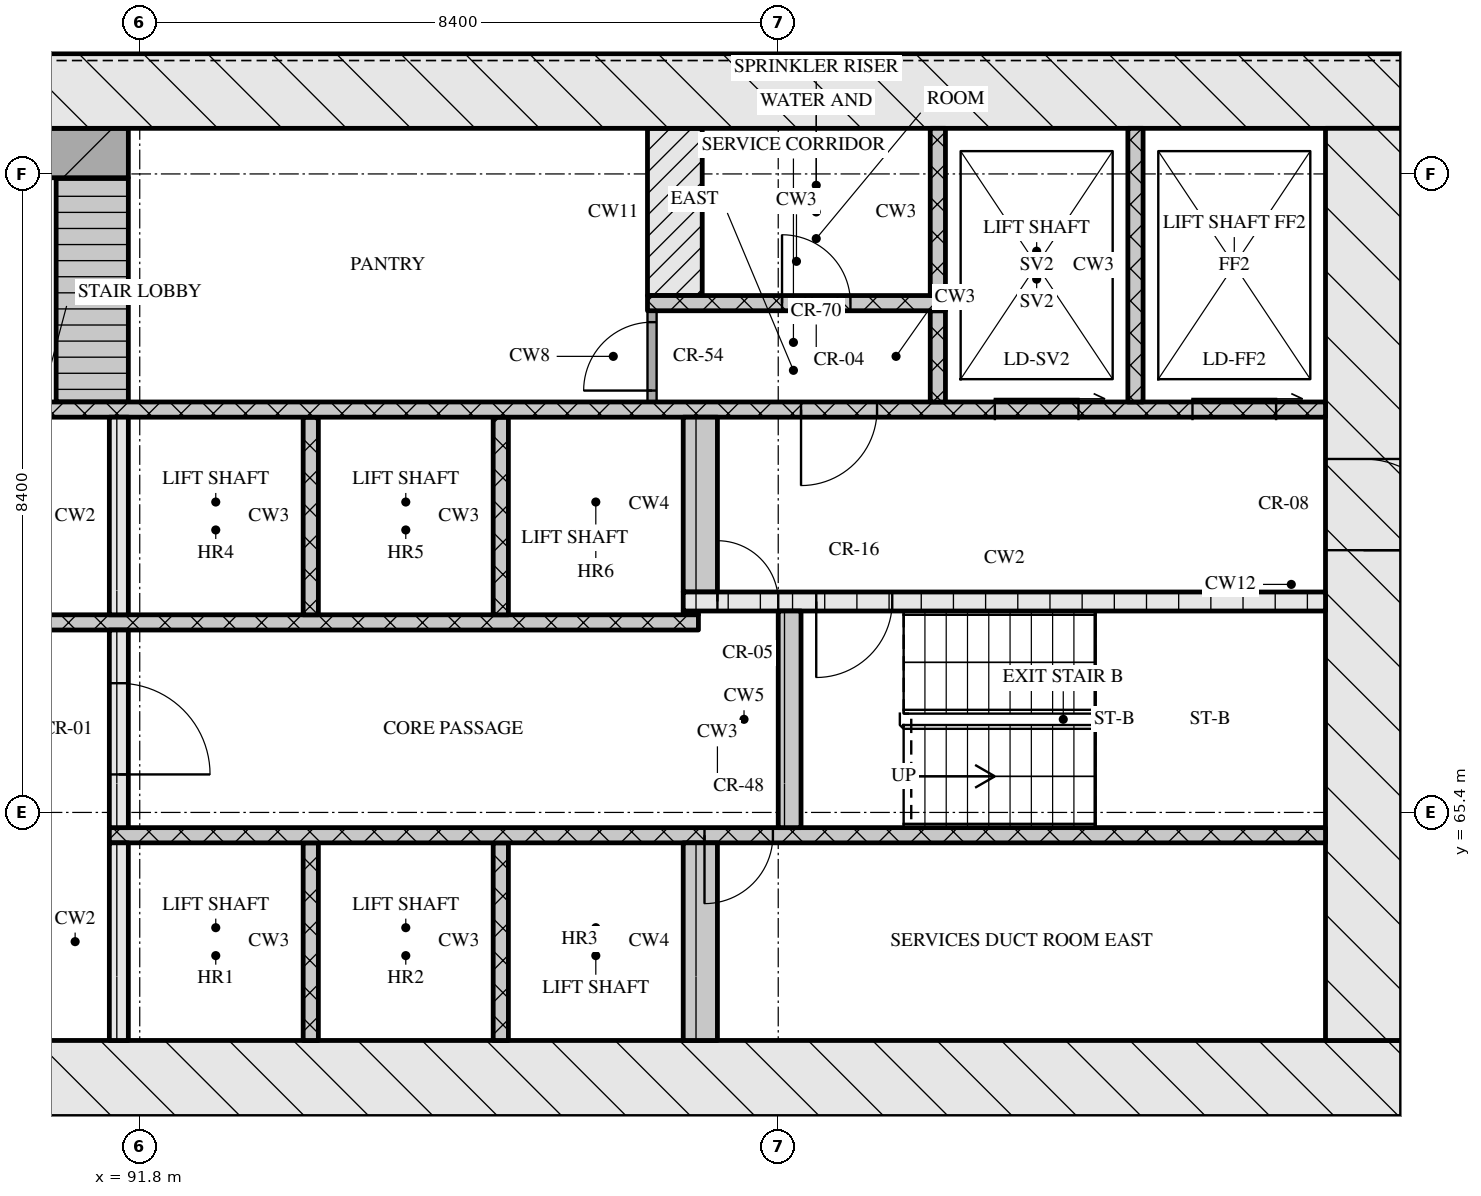
"""IFC4 building model, lengths in metres.
Left out: names, types, materials, properties, quantities, classifications, styles, units other than length and angle.
Written with IfcOpenShell. Run it as: python <this file> out.ifc"""

import sys

from ifc_helpers import new_model, si_unit, direction, frame, frame_2d, origin, place, context, subcontext, project, spatial, rectangle, extrude, element, fill, save


model = new_model("IFC4")
c1 = context("Model", 3, precision=1e-05, world=origin(), true_north=direction((0.0, 1.0)))
c2 = subcontext(c1, "Body", "Model", "MODEL_VIEW")
j1 = project(units=[si_unit("LENGTHUNIT", "METRE"), si_unit("PLANEANGLEUNIT", "RADIAN")], contexts=[c1])
p1 = place(None, origin())
s1 = spatial("IfcSite", under=j1, at=p1, CompositionType="ELEMENT")
p2 = place(p1, origin())
s2 = spatial("IfcBuilding", under=s1, at=p2, CompositionType="ELEMENT")
p3 = place(p2, frame((0.0, 0.0, 134.85)))
s3 = spatial("IfcBuildingStorey", under=s2, at=p3, CompositionType="ELEMENT", Elevation=134.85)
p4 = place(p3, frame((66.8, 61.9, 0.0), z_axis=(0.0, 0.0, 1.0), x_axis=(1.0, 0.0, 0.0)))
e1 = element("IfcWall", 1, at=p4, inside=s3, PredefinedType="SOLIDWALL", context=c2, shape_type="SweptSolid", body=[
    extrude(rectangle(XDim=41.6, YDim=1.0, at=frame_2d((20.8, 0.0))), origin(), (0.0, 0.0, 1.0), 3.32),
])
p5 = place(p4, frame((21.15, 0.0, 0.0)))
e2 = element("IfcOpeningElement", 2, at=p5, cuts=e1, PredefinedType="OPENING", context=c2, shape_type="SweptSolid", body=[
    extrude(rectangle(XDim=1.8, YDim=2.1, at=frame_2d((0.9, 1.05))), frame((0.0, 0.51, 0.0), z_axis=(0.0, -1.0, 0.0), x_axis=(1.0, 0.0, 0.0)), (0.0, 0.0, 1.0), 1.02),
])
p6 = place(p3, frame((66.8, 74.9, 0.0), z_axis=(0.0, 0.0, 1.0), x_axis=(1.0, 0.0, 0.0)))
e3 = element("IfcWall", 3, at=p6, inside=s3, PredefinedType="SOLIDWALL", context=c2, shape_type="SweptSolid", body=[
    extrude(rectangle(XDim=41.6, YDim=1.0, at=frame_2d((20.8, 0.0))), origin(), (0.0, 0.0, 1.0), 3.32),
])
p7 = place(p3, frame((107.9, 62.4, 0.0), z_axis=(0.0, 0.0, 1.0), x_axis=(0.0, 1.0, 0.0)))
e4 = element("IfcWall", 4, at=p7, inside=s3, PredefinedType="SOLIDWALL", context=c2, shape_type="SweptSolid", body=[
    extrude(rectangle(XDim=12.0, YDim=1.0, at=frame_2d((6.0, 0.0))), origin(), (0.0, 0.0, 1.0), 3.32),
])
p8 = place(p7, frame((6.45, 0.0, 0.0)))
e5 = element("IfcOpeningElement", 5, at=p8, cuts=e4, PredefinedType="OPENING", context=c2, shape_type="SweptSolid", body=[
    extrude(rectangle(XDim=1.2, YDim=2.1, at=frame_2d((0.6, 1.05))), frame((0.0, 0.51, 0.0), z_axis=(0.0, -1.0, 0.0), x_axis=(1.0, 0.0, 0.0)), (0.0, 0.0, 1.0), 1.02),
])
p9 = place(p3, frame((91.525, 62.4, 0.0), z_axis=(0.0, 0.0, 1.0), x_axis=(0.0, 1.0, 0.0)))
e6 = element("IfcWall", 6, at=p9, inside=s3, PredefinedType="SOLIDWALL", context=c2, shape_type="SweptSolid", body=[
    extrude(rectangle(XDim=2.6, YDim=0.25, at=frame_2d((1.3, 0.0))), origin(), (0.0, 0.0, 1.0), 3.32),
])
for number, where, z_axis, x_axis in (
    (7, (94.05, 62.4, 0.0), (0.0, 0.0, 1.0), (0.0, 1.0, 0.0)),
    (8, (96.55, 62.4, 0.0), (0.0, 0.0, 1.0), (0.0, 1.0, 0.0)),
):
    element("IfcWall", number, at=place(p3, frame(where, z_axis=z_axis, x_axis=x_axis)), inside=s3, PredefinedType="SOLIDWALL", context=c2, shape_type="SweptSolid", body=[
        extrude(rectangle(XDim=2.6, YDim=0.2, at=frame_2d((1.3, 0.0))), origin(), (0.0, 0.0, 1.0), 3.32),
    ])
p10 = place(p3, frame((99.175, 62.4, 0.0), z_axis=(0.0, 0.0, 1.0), x_axis=(0.0, 1.0, 0.0)))
e9 = element("IfcWall", 9, at=p10, inside=s3, PredefinedType="SOLIDWALL", context=c2, shape_type="SweptSolid", body=[
    extrude(rectangle(XDim=2.6, YDim=0.45, at=frame_2d((1.3, 0.0))), origin(), (0.0, 0.0, 1.0), 3.32),
])
p11 = place(p3, frame((91.4, 65.1, 0.0), z_axis=(0.0, 0.0, 1.0), x_axis=(1.0, 0.0, 0.0)))
e10 = element("IfcWall", 10, at=p11, inside=s3, PredefinedType="SOLIDWALL", context=c2, shape_type="SweptSolid", body=[
    extrude(rectangle(XDim=16.0, YDim=0.2, at=frame_2d((8.0, 0.0))), origin(), (0.0, 0.0, 1.0), 3.32),
])
p12 = place(p11, frame((7.83, 0.0, 0.0)))
e11 = element("IfcOpeningElement", 11, at=p12, cuts=e10, PredefinedType="OPENING", context=c2, shape_type="SweptSolid", body=[
    extrude(rectangle(XDim=0.9, YDim=2.1, at=frame_2d((0.45, 1.05))), frame((0.0, 0.11, 0.0), z_axis=(0.0, -1.0, 0.0), x_axis=(1.0, 0.0, 0.0)), (0.0, 0.0, 1.0), 0.22),
])
p13 = place(p3, frame((91.525, 65.2, 0.0), z_axis=(0.0, 0.0, 1.0), x_axis=(0.0, 1.0, 0.0)))
e12 = element("IfcWall", 12, at=p13, inside=s3, PredefinedType="SOLIDWALL", context=c2, shape_type="SweptSolid", body=[
    extrude(rectangle(XDim=2.6, YDim=0.25, at=frame_2d((1.3, 0.0))), origin(), (0.0, 0.0, 1.0), 3.32),
])
p14 = place(p13, frame((0.7, 0.0, 0.0)))
e13 = element("IfcOpeningElement", 13, at=p14, cuts=e12, PredefinedType="OPENING", context=c2, shape_type="SweptSolid", body=[
    extrude(rectangle(XDim=1.2, YDim=2.1, at=frame_2d((0.6, 1.05))), frame((0.0, 0.135, 0.0), z_axis=(0.0, -1.0, 0.0), x_axis=(1.0, 0.0, 0.0)), (0.0, 0.0, 1.0), 0.27),
])
p15 = place(p3, frame((100.35, 65.2, 0.0), z_axis=(0.0, 0.0, 1.0), x_axis=(0.0, 1.0, 0.0)))
e14 = element("IfcWall", 14, at=p15, inside=s3, PredefinedType="SOLIDWALL", context=c2, shape_type="SweptSolid", body=[
    extrude(rectangle(XDim=2.85, YDim=0.3, at=frame_2d((1.425, 0.0))), origin(), (0.0, 0.0, 1.0), 3.32),
])
p16 = place(p3, frame((76.05, 67.9, 0.0), z_axis=(0.0, 0.0, 1.0), x_axis=(1.0, 0.0, 0.0)))
e15 = element("IfcWall", 15, at=p16, inside=s3, PredefinedType="SOLIDWALL", context=c2, shape_type="SweptSolid", body=[
    extrude(rectangle(XDim=23.1, YDim=0.2, at=frame_2d((11.55, 0.0))), origin(), (0.0, 0.0, 1.0), 3.32),
])
p17 = place(p16, frame((0.6, 0.0, 0.0)))
e16 = element("IfcOpeningElement", 16, at=p17, cuts=e15, PredefinedType="OPENING", context=c2, shape_type="SweptSolid", body=[
    extrude(rectangle(XDim=1.1, YDim=2.1, at=frame_2d((0.55, 1.05))), frame((0.0, 0.11, 0.0), z_axis=(0.0, -1.0, 0.0), x_axis=(1.0, 0.0, 0.0)), (0.0, 0.0, 1.0), 0.22),
])
p18 = place(p16, frame((3.1, 0.0, 0.0)))
e17 = element("IfcOpeningElement", 17, at=p18, cuts=e15, PredefinedType="OPENING", context=c2, shape_type="SweptSolid", body=[
    extrude(rectangle(XDim=1.1, YDim=2.1, at=frame_2d((0.55, 1.05))), frame((0.0, 0.11, 0.0), z_axis=(0.0, -1.0, 0.0), x_axis=(1.0, 0.0, 0.0)), (0.0, 0.0, 1.0), 0.22),
])
p19 = place(p16, frame((5.6, 0.0, 0.0)))
e18 = element("IfcOpeningElement", 18, at=p19, cuts=e15, PredefinedType="OPENING", context=c2, shape_type="SweptSolid", body=[
    extrude(rectangle(XDim=1.1, YDim=2.1, at=frame_2d((0.55, 1.05))), frame((0.0, 0.11, 0.0), z_axis=(0.0, -1.0, 0.0), x_axis=(1.0, 0.0, 0.0)), (0.0, 0.0, 1.0), 0.22),
])
p20 = place(p16, frame((8.45, 0.0, 0.0)))
e19 = element("IfcOpeningElement", 19, at=p20, cuts=e15, PredefinedType="OPENING", context=c2, shape_type="SweptSolid", body=[
    extrude(rectangle(XDim=0.9, YDim=2.1, at=frame_2d((0.45, 1.05))), frame((0.0, 0.11, 0.0), z_axis=(0.0, -1.0, 0.0), x_axis=(1.0, 0.0, 0.0)), (0.0, 0.0, 1.0), 0.22),
])
p21 = place(p16, frame((10.91, 0.0, 0.0)))
e20 = element("IfcOpeningElement", 20, at=p21, cuts=e15, PredefinedType="OPENING", context=c2, shape_type="SweptSolid", body=[
    extrude(rectangle(XDim=0.9, YDim=2.1, at=frame_2d((0.45, 1.05))), frame((0.0, 0.11, 0.0), z_axis=(0.0, -1.0, 0.0), x_axis=(1.0, 0.0, 0.0)), (0.0, 0.0, 1.0), 0.22),
])
p22 = place(p16, frame((13.55, 0.0, 0.0)))
e21 = element("IfcOpeningElement", 21, at=p22, cuts=e15, PredefinedType="OPENING", context=c2, shape_type="SweptSolid", body=[
    extrude(rectangle(XDim=1.0, YDim=2.1, at=frame_2d((0.5, 1.05))), frame((0.0, 0.11, 0.0), z_axis=(0.0, -1.0, 0.0), x_axis=(1.0, 0.0, 0.0)), (0.0, 0.0, 1.0), 0.22),
])
p23 = place(p3, frame((91.525, 68.0, 0.0), z_axis=(0.0, 0.0, 1.0), x_axis=(0.0, 1.0, 0.0)))
e22 = element("IfcWall", 22, at=p23, inside=s3, PredefinedType="SOLIDWALL", context=c2, shape_type="SweptSolid", body=[
    extrude(rectangle(XDim=2.6, YDim=0.25, at=frame_2d((1.3, 0.0))), origin(), (0.0, 0.0, 1.0), 3.32),
])
for number, where, z_axis, x_axis in (
    (23, (94.05, 68.0, 0.0), (0.0, 0.0, 1.0), (0.0, 1.0, 0.0)),
    (24, (96.55, 68.0, 0.0), (0.0, 0.0, 1.0), (0.0, 1.0, 0.0)),
):
    element("IfcWall", number, at=place(p3, frame(where, z_axis=z_axis, x_axis=x_axis)), inside=s3, PredefinedType="SOLIDWALL", context=c2, shape_type="SweptSolid", body=[
        extrude(rectangle(XDim=2.6, YDim=0.2, at=frame_2d((1.3, 0.0))), origin(), (0.0, 0.0, 1.0), 3.32),
    ])
p24 = place(p3, frame((98.95, 68.025, 0.0), z_axis=(0.0, 0.0, 1.0), x_axis=(1.0, 0.0, 0.0)))
e25 = element("IfcWall", 25, at=p24, inside=s3, PredefinedType="SOLIDWALL", context=c2, shape_type="SweptSolid", body=[
    extrude(rectangle(XDim=0.2, YDim=0.05, at=frame_2d((0.1, 0.0))), origin(), (0.0, 0.0, 1.0), 3.32),
])
p25 = place(p3, frame((98.95, 68.175, 0.0), z_axis=(0.0, 0.0, 1.0), x_axis=(1.0, 0.0, 0.0)))
e26 = element("IfcWall", 26, at=p25, inside=s3, PredefinedType="SOLIDWALL", context=c2, shape_type="SweptSolid", body=[
    extrude(rectangle(XDim=8.45, YDim=0.25, at=frame_2d((4.225, 0.0))), origin(), (0.0, 0.0, 1.0), 3.32),
])
p26 = place(p25, frame((0.45, 0.0, 0.0)))
e27 = element("IfcOpeningElement", 27, at=p26, cuts=e26, PredefinedType="OPENING", context=c2, shape_type="SweptSolid", body=[
    extrude(rectangle(XDim=0.8, YDim=2.1, at=frame_2d((0.4, 1.05))), frame((0.0, 0.135, 0.0), z_axis=(0.0, -1.0, 0.0), x_axis=(1.0, 0.0, 0.0)), (0.0, 0.0, 1.0), 0.27),
])
p27 = place(p25, frame((1.75, 0.0, 0.0)))
e28 = element("IfcOpeningElement", 28, at=p27, cuts=e26, PredefinedType="OPENING", context=c2, shape_type="SweptSolid", body=[
    extrude(rectangle(XDim=1.0, YDim=2.1, at=frame_2d((0.5, 1.05))), frame((0.0, 0.135, 0.0), z_axis=(0.0, -1.0, 0.0), x_axis=(1.0, 0.0, 0.0)), (0.0, 0.0, 1.0), 0.27),
])
p28 = place(p3, frame((99.175, 68.3, 0.0), z_axis=(0.0, 0.0, 1.0), x_axis=(0.0, 1.0, 0.0)))
e29 = element("IfcWall", 29, at=p28, inside=s3, PredefinedType="SOLIDWALL", context=c2, shape_type="SweptSolid", body=[
    extrude(rectangle(XDim=2.3, YDim=0.45, at=frame_2d((1.15, 0.0))), origin(), (0.0, 0.0, 1.0), 3.32),
])
p29 = place(p3, frame((67.8, 70.7, 0.0), z_axis=(0.0, 0.0, 1.0), x_axis=(1.0, 0.0, 0.0)))
e30 = element("IfcWall", 30, at=p29, inside=s3, PredefinedType="SOLIDWALL", context=c2, shape_type="SweptSolid", body=[
    extrude(rectangle(XDim=39.6, YDim=0.2, at=frame_2d((19.8, 0.0))), origin(), (0.0, 0.0, 1.0), 3.32),
])
p30 = place(p29, frame((0.65, 0.0, 0.0)))
e31 = element("IfcOpeningElement", 31, at=p30, cuts=e30, PredefinedType="OPENING", context=c2, shape_type="SweptSolid", body=[
    extrude(rectangle(XDim=1.1, YDim=2.1, at=frame_2d((0.55, 1.05))), frame((0.0, 0.11, 0.0), z_axis=(0.0, -1.0, 0.0), x_axis=(1.0, 0.0, 0.0)), (0.0, 0.0, 1.0), 0.22),
])
p31 = place(p29, frame((3.25, 0.0, 0.0)))
e32 = element("IfcOpeningElement", 32, at=p31, cuts=e30, PredefinedType="OPENING", context=c2, shape_type="SweptSolid", body=[
    extrude(rectangle(XDim=1.1, YDim=2.1, at=frame_2d((0.55, 1.05))), frame((0.0, 0.11, 0.0), z_axis=(0.0, -1.0, 0.0), x_axis=(1.0, 0.0, 0.0)), (0.0, 0.0, 1.0), 0.22),
])
p32 = place(p29, frame((5.9, 0.0, 0.0)))
e33 = element("IfcOpeningElement", 33, at=p32, cuts=e30, PredefinedType="OPENING", context=c2, shape_type="SweptSolid", body=[
    extrude(rectangle(XDim=1.0, YDim=2.1, at=frame_2d((0.5, 1.05))), frame((0.0, 0.11, 0.0), z_axis=(0.0, -1.0, 0.0), x_axis=(1.0, 0.0, 0.0)), (0.0, 0.0, 1.0), 0.22),
])
p33 = place(p29, frame((21.7, 0.0, 0.0)))
e34 = element("IfcOpeningElement", 34, at=p33, cuts=e30, PredefinedType="OPENING", context=c2, shape_type="SweptSolid", body=[
    extrude(rectangle(XDim=1.0, YDim=2.1, at=frame_2d((0.5, 1.05))), frame((0.0, 0.11, 0.0), z_axis=(0.0, -1.0, 0.0), x_axis=(1.0, 0.0, 0.0)), (0.0, 0.0, 1.0), 0.22),
])
p34 = place(p29, frame((32.7, 0.0, 0.0)))
e35 = element("IfcOpeningElement", 35, at=p34, cuts=e30, PredefinedType="OPENING", context=c2, shape_type="SweptSolid", body=[
    extrude(rectangle(XDim=1.0, YDim=2.1, at=frame_2d((0.5, 1.05))), frame((0.0, 0.11, 0.0), z_axis=(0.0, -1.0, 0.0), x_axis=(1.0, 0.0, 0.0)), (0.0, 0.0, 1.0), 0.22),
])
p35 = place(p29, frame((35.25, 0.0, 0.0)))
e36 = element("IfcOpeningElement", 36, at=p35, cuts=e30, PredefinedType="OPENING", context=c2, shape_type="SweptSolid", body=[
    extrude(rectangle(XDim=1.1, YDim=2.1, at=frame_2d((0.55, 1.05))), frame((0.0, 0.11, 0.0), z_axis=(0.0, -1.0, 0.0), x_axis=(1.0, 0.0, 0.0)), (0.0, 0.0, 1.0), 0.22),
])
p36 = place(p29, frame((37.85, 0.0, 0.0)))
e37 = element("IfcOpeningElement", 37, at=p36, cuts=e30, PredefinedType="OPENING", context=c2, shape_type="SweptSolid", body=[
    extrude(rectangle(XDim=1.1, YDim=2.1, at=frame_2d((0.55, 1.05))), frame((0.0, 0.11, 0.0), z_axis=(0.0, -1.0, 0.0), x_axis=(1.0, 0.0, 0.0)), (0.0, 0.0, 1.0), 0.22),
])
p37 = place(p3, frame((91.175, 70.8, 0.0), z_axis=(0.0, 0.0, 1.0), x_axis=(0.0, 1.0, 0.0)))
e38 = element("IfcWall", 38, at=p37, inside=s3, PredefinedType="SOLIDWALL", context=c2, shape_type="SweptSolid", body=[
    extrude(rectangle(XDim=2.95, YDim=0.95, at=frame_2d((1.475, 0.0))), origin(), (0.0, 0.0, 1.0), 3.32),
])
p38 = place(p3, frame((98.54, 70.8, 0.0), z_axis=(0.0, 0.0, 1.0), x_axis=(0.0, 1.0, 0.0)))
e39 = element("IfcWall", 39, at=p38, inside=s3, PredefinedType="PARTITIONING", context=c2, shape_type="SweptSolid", body=[
    extrude(rectangle(XDim=1.2, YDim=0.12, at=frame_2d((0.6, 0.0))), origin(), (0.0, 0.0, 1.0), 3.32),
])
p39 = place(p38, frame((0.15, 0.0, 0.0)))
e40 = element("IfcOpeningElement", 40, at=p39, cuts=e39, PredefinedType="OPENING", context=c2, shape_type="SweptSolid", body=[
    extrude(rectangle(XDim=0.9, YDim=2.1, at=frame_2d((0.45, 1.05))), frame((0.0, 0.07, 0.0), z_axis=(0.0, -1.0, 0.0), x_axis=(1.0, 0.0, 0.0)), (0.0, 0.0, 1.0), 0.14),
])
p40 = place(p3, frame((102.3, 70.8, 0.0), z_axis=(0.0, 0.0, 1.0), x_axis=(0.0, 1.0, 0.0)))
e41 = element("IfcWall", 41, at=p40, inside=s3, PredefinedType="SOLIDWALL", context=c2, shape_type="SweptSolid", body=[
    extrude(rectangle(XDim=1.2, YDim=0.2, at=frame_2d((0.6, 0.0))), origin(), (0.0, 0.0, 1.0), 3.32),
])
p41 = place(p3, frame((104.9, 70.8, 0.0), z_axis=(0.0, 0.0, 1.0), x_axis=(0.0, 1.0, 0.0)))
e42 = element("IfcWall", 42, at=p41, inside=s3, PredefinedType="SOLIDWALL", context=c2, shape_type="SweptSolid", body=[
    extrude(rectangle(XDim=3.6, YDim=0.2, at=frame_2d((1.8, 0.0))), origin(), (0.0, 0.0, 1.0), 3.32),
])
p42 = place(p3, frame((98.48, 72.1, 0.0), z_axis=(0.0, 0.0, 1.0), x_axis=(1.0, 0.0, 0.0)))
e43 = element("IfcWall", 43, at=p42, inside=s3, PredefinedType="SOLIDWALL", context=c2, shape_type="SweptSolid", body=[
    extrude(rectangle(XDim=3.92, YDim=0.2, at=frame_2d((1.96, 0.0))), origin(), (0.0, 0.0, 1.0), 3.32),
])
p43 = place(p42, frame((1.77, 0.0, 0.0)))
e44 = element("IfcOpeningElement", 44, at=p43, cuts=e43, PredefinedType="OPENING", context=c2, shape_type="SweptSolid", body=[
    extrude(rectangle(XDim=0.9, YDim=2.1, at=frame_2d((0.45, 1.05))), frame((0.0, 0.11, 0.0), z_axis=(0.0, -1.0, 0.0), x_axis=(1.0, 0.0, 0.0)), (0.0, 0.0, 1.0), 0.22),
])
p44 = place(p3, frame((98.84, 72.2, 0.0), z_axis=(0.0, 0.0, 1.0), x_axis=(0.0, 1.0, 0.0)))
e45 = element("IfcWall", 45, at=p44, inside=s3, PredefinedType="SOLIDWALL", context=c2, shape_type="SweptSolid", body=[
    extrude(rectangle(XDim=2.2, YDim=0.72, at=frame_2d((1.1, 0.0))), origin(), (0.0, 0.0, 1.0), 3.32),
])
p45 = place(p3, frame((102.3, 72.2, 0.0), z_axis=(0.0, 0.0, 1.0), x_axis=(0.0, 1.0, 0.0)))
e46 = element("IfcWall", 46, at=p45, inside=s3, PredefinedType="SOLIDWALL", context=c2, shape_type="SweptSolid", body=[
    extrude(rectangle(XDim=2.2, YDim=0.2, at=frame_2d((1.1, 0.0))), origin(), (0.0, 0.0, 1.0), 3.32),
])
p46 = place(p3, frame((83.55, 74.075, 0.0), z_axis=(0.0, 0.0, 1.0), x_axis=(1.0, 0.0, 0.0)))
e47 = element("IfcWall", 47, at=p46, inside=s3, PredefinedType="SOLIDWALL", context=c2, shape_type="SweptSolid", body=[
    extrude(rectangle(XDim=8.1, YDim=0.65, at=frame_2d((4.05, 0.0))), origin(), (0.0, 0.0, 1.0), 3.32),
])
p47 = place(p12, origin())
e48 = element("IfcDoor", 48, at=p47, inside=s3, OperationType="SINGLE_SWING_RIGHT", PredefinedType="DOOR", context=c2, shape_type="SweptSolid", body=[
    extrude(rectangle(XDim=0.9, YDim=2.1, at=frame_2d((0.45, 1.05))), frame((0.0, 0.025, 0.0), z_axis=(0.0, -1.0, 0.0), x_axis=(1.0, 0.0, 0.0)), (0.0, 0.0, 1.0), 0.05),
])
fill(e11, e48)
p48 = place(p14, origin())
e49 = element("IfcDoor", 49, at=p48, inside=s3, OperationType="SINGLE_SWING_RIGHT", PredefinedType="DOOR", context=c2, shape_type="SweptSolid", body=[
    extrude(rectangle(XDim=1.2, YDim=2.1, at=frame_2d((0.6, 1.05))), frame((0.0, 0.025, 0.0), z_axis=(0.0, -1.0, 0.0), x_axis=(1.0, 0.0, 0.0)), (0.0, 0.0, 1.0), 0.05),
])
fill(e13, e49)
p49 = place(p26, origin())
e50 = element("IfcDoor", 50, at=p49, inside=s3, OperationType="SINGLE_SWING_LEFT", PredefinedType="DOOR", context=c2, shape_type="SweptSolid", body=[
    extrude(rectangle(XDim=0.8, YDim=2.1, at=frame_2d((0.4, 1.05))), frame((0.0, 0.025, 0.0), z_axis=(0.0, -1.0, 0.0), x_axis=(1.0, 0.0, 0.0)), (0.0, 0.0, 1.0), 0.05),
])
fill(e27, e50)
p50 = place(p27, origin())
e51 = element("IfcDoor", 51, at=p50, inside=s3, OperationType="SINGLE_SWING_RIGHT", PredefinedType="DOOR", context=c2, shape_type="SweptSolid", body=[
    extrude(rectangle(XDim=1.0, YDim=2.1, at=frame_2d((0.5, 1.05))), frame((0.0, 0.025, 0.0), z_axis=(0.0, -1.0, 0.0), x_axis=(1.0, 0.0, 0.0)), (0.0, 0.0, 1.0), 0.05),
])
fill(e28, e51)
p51 = place(p8, origin())
e52 = element("IfcDoor", 52, at=p51, inside=s3, OperationType="SINGLE_SWING_RIGHT", PredefinedType="DOOR", context=c2, shape_type="SweptSolid", body=[
    extrude(rectangle(XDim=1.2, YDim=2.1, at=frame_2d((0.6, 1.05))), frame((0.0, 0.025, 0.0), z_axis=(0.0, -1.0, 0.0), x_axis=(1.0, 0.0, 0.0)), (0.0, 0.0, 1.0), 0.05),
])
fill(e5, e52)
p52 = place(p34, origin())
e53 = element("IfcDoor", 53, at=p52, inside=s3, OperationType="SINGLE_SWING_RIGHT", PredefinedType="DOOR", context=c2, shape_type="SweptSolid", body=[
    extrude(rectangle(XDim=1.0, YDim=2.1, at=frame_2d((0.5, 1.05))), frame((0.0, 0.025, 0.0), z_axis=(0.0, -1.0, 0.0), x_axis=(1.0, 0.0, 0.0)), (0.0, 0.0, 1.0), 0.05),
])
fill(e35, e53)
p53 = place(p35, origin())
e54 = element("IfcDoor", 54, at=p53, inside=s3, OperationType="SLIDING_TO_RIGHT", PredefinedType="DOOR", context=c2, shape_type="SweptSolid", body=[
    extrude(rectangle(XDim=1.1, YDim=2.1, at=frame_2d((0.55, 1.05))), frame((0.0, 0.025, 0.0), z_axis=(0.0, -1.0, 0.0), x_axis=(1.0, 0.0, 0.0)), (0.0, 0.0, 1.0), 0.05),
])
fill(e36, e54)
p54 = place(p36, origin())
e55 = element("IfcDoor", 55, at=p54, inside=s3, OperationType="SLIDING_TO_RIGHT", PredefinedType="DOOR", context=c2, shape_type="SweptSolid", body=[
    extrude(rectangle(XDim=1.1, YDim=2.1, at=frame_2d((0.55, 1.05))), frame((0.0, 0.025, 0.0), z_axis=(0.0, -1.0, 0.0), x_axis=(1.0, 0.0, 0.0)), (0.0, 0.0, 1.0), 0.05),
])
fill(e37, e55)
p55 = place(p39, origin())
e56 = element("IfcDoor", 56, at=p55, inside=s3, OperationType="SINGLE_SWING_LEFT", PredefinedType="DOOR", context=c2, shape_type="SweptSolid", body=[
    extrude(rectangle(XDim=0.9, YDim=2.1, at=frame_2d((0.45, 1.05))), frame((0.0, 0.025, 0.0), z_axis=(0.0, -1.0, 0.0), x_axis=(1.0, 0.0, 0.0)), (0.0, 0.0, 1.0), 0.05),
])
fill(e40, e56)
p56 = place(p43, origin())
e57 = element("IfcDoor", 57, at=p56, inside=s3, OperationType="SINGLE_SWING_LEFT", PredefinedType="DOOR", context=c2, shape_type="SweptSolid", body=[
    extrude(rectangle(XDim=0.9, YDim=2.1, at=frame_2d((0.45, 1.05))), frame((0.0, 0.025, 0.0), z_axis=(0.0, -1.0, 0.0), x_axis=(1.0, 0.0, 0.0)), (0.0, 0.0, 1.0), 0.05),
])
fill(e44, e57)
save(model, sys.argv[1])
